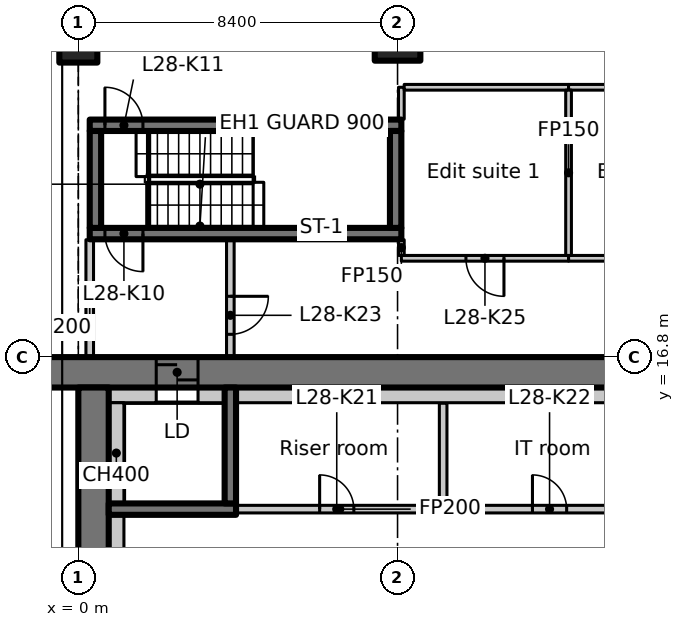
"""IFC4 building model, lengths in metres.
Left out: names, types, materials, properties, quantities, classifications, styles, units other than length and angle.
Written with IfcOpenShell. Run it as: python <this file> out.ifc"""

import sys

from ifc_helpers import new_model, si_unit, direction, frame, frame_2d, origin, origin_2d, place, context, subcontext, project, spatial, rectangle, extrude, element, fill, save


model = new_model("IFC4")
c1 = context("Model", 3, precision=1e-05, world=origin(), true_north=direction((0.0, 1.0)))
c2 = subcontext(c1, "Body", "Model", "MODEL_VIEW")
j1 = project(units=[si_unit("LENGTHUNIT", "METRE"), si_unit("PLANEANGLEUNIT", "RADIAN")], contexts=[c1])
p1 = place(None, origin())
s1 = spatial("IfcSite", under=j1, at=p1, CompositionType="ELEMENT")
p2 = place(p1, origin())
s2 = spatial("IfcBuilding", under=s1, at=p2, CompositionType="ELEMENT")
p3 = place(p2, frame((0.0, 0.0, 116.9)))
s3 = spatial("IfcBuildingStorey", under=s2, at=p3, CompositionType="ELEMENT", Elevation=116.9)
p4 = place(p3, frame((0.0, 25.2, 0.0), z_axis=(0.0, 0.0, 1.0), x_axis=(1.0, 0.0, 0.0)))
e1 = element("IfcColumn", 1, at=p4, inside=s3, PredefinedType="COLUMN", context=c2, shape_type="SweptSolid", body=[
    extrude(rectangle(XDim=1.0, YDim=1.3, at=origin_2d()), origin(), (0.0, 0.0, 1.0), 3.35),
])
p5 = place(p3, frame((8.4, 25.2, 0.0), z_axis=(0.0, 0.0, 1.0), x_axis=(1.0, 0.0, 0.0)))
e2 = element("IfcColumn", 2, at=p5, inside=s3, PredefinedType="COLUMN", context=c2, shape_type="SweptSolid", body=[
    extrude(rectangle(XDim=1.2, YDim=1.2, at=origin_2d()), origin(), (0.0, 0.0, 1.0), 3.35),
])
p6 = place(p3, frame((-1.1, 16.4, 0.0), z_axis=(0.0, 0.0, 1.0), x_axis=(1.0, 0.0, 0.0)))
e3 = element("IfcWall", 3, at=p6, inside=s3, PredefinedType="SHEAR", context=c2, shape_type="SweptSolid", body=[
    extrude(rectangle(XDim=22.1, YDim=0.8, at=frame_2d((11.05, 0.0))), origin(), (0.0, 0.0, 1.0), 3.35),
])
p7 = place(p6, frame((3.15, 0.0, 0.0)))
e4 = element("IfcOpeningElement", 4, at=p7, cuts=e3, PredefinedType="OPENING", context=c2, shape_type="SweptSolid", body=[
    extrude(rectangle(XDim=1.1, YDim=2.3, at=frame_2d((0.55, 1.15))), frame((0.0, 0.41, 0.0), z_axis=(0.0, -1.0, 0.0), x_axis=(1.0, 0.0, 0.0)), (0.0, 0.0, 1.0), 0.82),
])
p8 = place(p3, frame((0.4, 7.136, 0.0), z_axis=(0.0, 0.0, 1.0), x_axis=(0.0, 1.0, 0.0)))
e5 = element("IfcWall", 5, at=p8, inside=s3, PredefinedType="SHEAR", context=c2, shape_type="SweptSolid", body=[
    extrude(rectangle(XDim=8.864, YDim=0.8, at=frame_2d((4.432, 0.0))), origin(), (0.0, 0.0, 1.0), 3.35),
])
p9 = place(p3, frame((0.8, 15.8, 0.0), z_axis=(0.0, 0.0, 1.0), x_axis=(1.0, 0.0, 0.0)))
e6 = element("IfcWall", 6, at=p9, inside=s3, PredefinedType="PARTITIONING", context=c2, shape_type="SweptSolid", body=[
    extrude(rectangle(XDim=1.25, YDim=0.4, at=frame_2d((0.625, 0.0))), origin(), (0.0, 0.0, 1.0), 3.35),
])
p10 = place(p3, frame((0.8, 12.8, 0.0), z_axis=(0.0, 0.0, 1.0), x_axis=(1.0, 0.0, 0.0)))
e7 = element("IfcWall", 7, at=p10, inside=s3, PredefinedType="SHEAR", context=c2, shape_type="SweptSolid", body=[
    extrude(rectangle(XDim=3.35, YDim=0.3, at=frame_2d((1.675, 0.0))), origin(), (0.0, 0.0, 1.0), 3.35),
])
p11 = place(p3, frame((4.0, 12.95, 0.0), z_axis=(0.0, 0.0, 1.0), x_axis=(0.0, 1.0, 0.0)))
e8 = element("IfcWall", 8, at=p11, inside=s3, PredefinedType="SHEAR", context=c2, shape_type="SweptSolid", body=[
    extrude(rectangle(XDim=3.05, YDim=0.3, at=frame_2d((1.525, 0.0))), origin(), (0.0, 0.0, 1.0), 3.35),
])
p12 = place(p3, frame((8.5, 20.05, 0.0), z_axis=(0.0, 0.0, 1.0), x_axis=(-1.0, 0.0, 0.0)))
e9 = element("IfcWall", 9, at=p12, inside=s3, PredefinedType="SHEAR", context=c2, shape_type="SweptSolid", body=[
    extrude(rectangle(XDim=8.2, YDim=0.3, at=frame_2d((4.1, 0.0))), origin(), (0.0, 0.0, 1.0), 3.35),
])
p13 = place(p12, frame((6.8, 0.0, 0.0)))
e10 = element("IfcOpeningElement", 10, at=p13, cuts=e9, PredefinedType="OPENING", context=c2, shape_type="SweptSolid", body=[
    extrude(rectangle(XDim=1.0, YDim=2.1, at=frame_2d((0.5, 1.05))), frame((0.0, 0.16, 0.0), z_axis=(0.0, -1.0, 0.0), x_axis=(1.0, 0.0, 0.0)), (0.0, 0.0, 1.0), 0.32),
])
p14 = place(p3, frame((0.3, 22.9, 0.0), z_axis=(0.0, 0.0, 1.0), x_axis=(1.0, 0.0, 0.0)))
e11 = element("IfcWall", 11, at=p14, inside=s3, PredefinedType="SHEAR", context=c2, shape_type="SweptSolid", body=[
    extrude(rectangle(XDim=8.2, YDim=0.3, at=frame_2d((4.1, 0.0))), origin(), (0.0, 0.0, 1.0), 3.35),
])
p15 = place(p14, frame((0.4, 0.0, 0.0)))
e12 = element("IfcOpeningElement", 12, at=p15, cuts=e11, PredefinedType="OPENING", context=c2, shape_type="SweptSolid", body=[
    extrude(rectangle(XDim=1.0, YDim=2.1, at=frame_2d((0.5, 1.05))), frame((0.0, 0.16, 0.0), z_axis=(0.0, -1.0, 0.0), x_axis=(1.0, 0.0, 0.0)), (0.0, 0.0, 1.0), 0.32),
])
for number, where, z_axis, x_axis in (
    (13, (0.45, 20.2, 0.0), (0.0, 0.0, 1.0), (0.0, 1.0, 0.0)),
    (14, (8.35, 20.2, 0.0), (0.0, 0.0, 1.0), (0.0, 1.0, 0.0)),
):
    element("IfcWall", number, at=place(p3, frame(where, z_axis=z_axis, x_axis=x_axis)), inside=s3, PredefinedType="SHEAR", context=c2, shape_type="SweptSolid", body=[
        extrude(rectangle(XDim=2.55, YDim=0.3, at=frame_2d((1.275, 0.0))), origin(), (0.0, 0.0, 1.0), 3.35),
    ])
p16 = place(p3, frame((0.3, 16.812, 0.0), z_axis=(0.0, 0.0, 1.0), x_axis=(0.0, 1.0, 0.0)))
e15 = element("IfcWall", 15, at=p16, inside=s3, PredefinedType="PARTITIONING", context=c2, shape_type="SweptSolid", body=[
    extrude(rectangle(XDim=3.076, YDim=0.2, at=frame_2d((1.538, 0.0))), origin(), (0.0, 0.0, 1.0), 2.98),
])
p17 = place(p3, frame((4.0, 19.888, 0.0), z_axis=(0.0, 0.0, 1.0), x_axis=(0.0, -1.0, 0.0)))
e16 = element("IfcWall", 16, at=p17, inside=s3, PredefinedType="PARTITIONING", context=c2, shape_type="SweptSolid", body=[
    extrude(rectangle(XDim=3.076, YDim=0.2, at=frame_2d((1.538, 0.0))), origin(), (0.0, 0.0, 1.0), 3.35),
])
p18 = place(p17, frame((1.488, 0.0, 0.0)))
e17 = element("IfcOpeningElement", 17, at=p18, cuts=e16, PredefinedType="OPENING", context=c2, shape_type="SweptSolid", body=[
    extrude(rectangle(XDim=1.0, YDim=2.1, at=frame_2d((0.5, 1.05))), frame((0.0, 0.11, 0.0), z_axis=(0.0, -1.0, 0.0), x_axis=(1.0, 0.0, 0.0)), (0.0, 0.0, 1.0), 0.22),
])
p19 = place(p3, frame((4.162, 12.8, 0.0), z_axis=(0.0, 0.0, 1.0), x_axis=(1.0, 0.0, 0.0)))
e18 = element("IfcWall", 18, at=p19, inside=s3, PredefinedType="PARTITIONING", context=c2, shape_type="SweptSolid", body=[
    extrude(rectangle(XDim=5.438, YDim=0.2, at=frame_2d((2.719, 0.0))), origin(), (0.0, 0.0, 1.0), 3.35),
])
p20 = place(p19, frame((2.188, 0.0, 0.0)))
e19 = element("IfcOpeningElement", 19, at=p20, cuts=e18, PredefinedType="OPENING", context=c2, shape_type="SweptSolid", body=[
    extrude(rectangle(XDim=0.9, YDim=2.1, at=frame_2d((0.45, 1.05))), frame((0.0, 0.11, 0.0), z_axis=(0.0, -1.0, 0.0), x_axis=(1.0, 0.0, 0.0)), (0.0, 0.0, 1.0), 0.22),
])
p21 = place(p3, frame((9.6, 12.8, 0.0), z_axis=(0.0, 0.0, 1.0), x_axis=(1.0, 0.0, 0.0)))
e20 = element("IfcWall", 20, at=p21, inside=s3, PredefinedType="PARTITIONING", context=c2, shape_type="SweptSolid", body=[
    extrude(rectangle(XDim=5.438, YDim=0.2, at=frame_2d((2.719, 0.0))), origin(), (0.0, 0.0, 1.0), 3.35),
])
p22 = place(p21, frame((2.35, 0.0, 0.0)))
e21 = element("IfcOpeningElement", 21, at=p22, cuts=e20, PredefinedType="OPENING", context=c2, shape_type="SweptSolid", body=[
    extrude(rectangle(XDim=0.9, YDim=2.1, at=frame_2d((0.45, 1.05))), frame((0.0, 0.11, 0.0), z_axis=(0.0, -1.0, 0.0), x_axis=(1.0, 0.0, 0.0)), (0.0, 0.0, 1.0), 0.22),
])
p23 = place(p3, frame((9.6, 15.588, 0.0), z_axis=(0.0, 0.0, 1.0), x_axis=(0.0, -1.0, 0.0)))
e22 = element("IfcWall", 22, at=p23, inside=s3, PredefinedType="PARTITIONING", context=c2, shape_type="SweptSolid", body=[
    extrude(rectangle(XDim=2.688, YDim=0.2, at=frame_2d((1.344, 0.0))), origin(), (0.0, 0.0, 1.0), 3.35),
])
p24 = place(p3, frame((12.9, 19.4, 0.0), z_axis=(0.0, 0.0, 1.0), x_axis=(-1.0, 0.0, 0.0)))
e23 = element("IfcWall", 23, at=p24, inside=s3, PredefinedType="PARTITIONING", context=c2, shape_type="SweptSolid", body=[
    extrude(rectangle(XDim=4.4, YDim=0.15, at=frame_2d((2.2, 0.0))), origin(), (0.0, 0.0, 1.0), 3.35),
])
p25 = place(p24, frame((1.7, 0.0, 0.0)))
e24 = element("IfcOpeningElement", 24, at=p25, cuts=e23, PredefinedType="OPENING", context=c2, shape_type="SweptSolid", body=[
    extrude(rectangle(XDim=1.0, YDim=2.1, at=frame_2d((0.5, 1.05))), frame((0.0, 0.085, 0.0), z_axis=(0.0, -1.0, 0.0), x_axis=(1.0, 0.0, 0.0)), (0.0, 0.0, 1.0), 0.17),
])
p26 = place(p3, frame((8.5, 19.475, 0.0), z_axis=(0.0, 0.0, 1.0), x_axis=(0.0, 1.0, 0.0)))
e25 = element("IfcWall", 25, at=p26, inside=s3, PredefinedType="PARTITIONING", context=c2, shape_type="SweptSolid", body=[
    extrude(rectangle(XDim=0.413, YDim=0.15, at=frame_2d((0.207, 0.0))), origin(), (0.0, 0.0, 1.0), 3.35),
])
p27 = place(p3, frame((8.5, 23.062, 0.0), z_axis=(0.0, 0.0, 1.0), x_axis=(0.0, 1.0, 0.0)))
e26 = element("IfcWall", 26, at=p27, inside=s3, PredefinedType="PARTITIONING", context=c2, shape_type="SweptSolid", body=[
    extrude(rectangle(XDim=0.838, YDim=0.15, at=frame_2d((0.419, 0.0))), origin(), (0.0, 0.0, 1.0), 3.35),
])
p28 = place(p3, frame((8.575, 23.9, 0.0), z_axis=(0.0, 0.0, 1.0), x_axis=(1.0, 0.0, 0.0)))
e27 = element("IfcWall", 27, at=p28, inside=s3, PredefinedType="PARTITIONING", context=c2, shape_type="SweptSolid", body=[
    extrude(rectangle(XDim=4.325, YDim=0.15, at=frame_2d((2.163, 0.0))), origin(), (0.0, 0.0, 1.0), 3.35),
])
p29 = place(p3, frame((12.9, 23.9, 0.0), z_axis=(0.0, 0.0, 1.0), x_axis=(1.0, 0.0, 0.0)))
e28 = element("IfcWall", 28, at=p29, inside=s3, PredefinedType="PARTITIONING", context=c2, shape_type="SweptSolid", body=[
    extrude(rectangle(XDim=4.5, YDim=0.15, at=frame_2d((2.25, 0.0))), origin(), (0.0, 0.0, 1.0), 3.35),
])
p30 = place(p3, frame((17.325, 19.4, 0.0), z_axis=(0.0, 0.0, 1.0), x_axis=(-1.0, 0.0, 0.0)))
e29 = element("IfcWall", 29, at=p30, inside=s3, PredefinedType="PARTITIONING", context=c2, shape_type="SweptSolid", body=[
    extrude(rectangle(XDim=4.425, YDim=0.15, at=frame_2d((2.212, 0.0))), origin(), (0.0, 0.0, 1.0), 3.35),
])
p31 = place(p30, frame((1.675, 0.0, 0.0)))
e30 = element("IfcOpeningElement", 30, at=p31, cuts=e29, PredefinedType="OPENING", context=c2, shape_type="SweptSolid", body=[
    extrude(rectangle(XDim=1.0, YDim=2.1, at=frame_2d((0.5, 1.05))), frame((0.0, 0.085, 0.0), z_axis=(0.0, -1.0, 0.0), x_axis=(1.0, 0.0, 0.0)), (0.0, 0.0, 1.0), 0.17),
])
p32 = place(p3, frame((12.9, 23.825, 0.0), z_axis=(0.0, 0.0, 1.0), x_axis=(0.0, -1.0, 0.0)))
e31 = element("IfcWall", 31, at=p32, inside=s3, PredefinedType="PARTITIONING", context=c2, shape_type="SweptSolid", body=[
    extrude(rectangle(XDim=4.35, YDim=0.15, at=frame_2d((2.175, 0.0))), origin(), (0.0, 0.0, 1.0), 3.35),
])
p33 = place(p3, frame((1.0, 9.75, 0.0), z_axis=(0.0, 0.0, 1.0), x_axis=(0.0, 1.0, 0.0)))
e32 = element("IfcWall", 32, at=p33, inside=s3, PredefinedType="PARTITIONING", context=c2, shape_type="SweptSolid", body=[
    extrude(rectangle(XDim=2.9, YDim=0.4, at=frame_2d((1.45, 0.0))), origin(), (0.0, 0.0, 1.0), 3.35),
])
p34 = place(p3, frame((1.0, 12.95, 0.0), z_axis=(0.0, 0.0, 1.0), x_axis=(0.0, 1.0, 0.0)))
e33 = element("IfcWall", 33, at=p34, inside=s3, PredefinedType="PARTITIONING", context=c2, shape_type="SweptSolid", body=[
    extrude(rectangle(XDim=2.65, YDim=0.4, at=frame_2d((1.325, 0.0))), origin(), (0.0, 0.0, 1.0), 3.35),
])
p35 = place(p3, frame((3.15, 15.8, 0.0), z_axis=(0.0, 0.0, 1.0), x_axis=(1.0, 0.0, 0.0)))
e34 = element("IfcWall", 34, at=p35, inside=s3, PredefinedType="PARTITIONING", context=c2, shape_type="SweptSolid", body=[
    extrude(rectangle(XDim=0.7, YDim=0.4, at=frame_2d((0.35, 0.0))), origin(), (0.0, 0.0, 1.0), 3.35),
])
p36 = place(p3, frame((4.15, 15.8, 0.0), z_axis=(0.0, 0.0, 1.0), x_axis=(1.0, 0.0, 0.0)))
e35 = element("IfcWall", 35, at=p36, inside=s3, PredefinedType="PARTITIONING", context=c2, shape_type="SweptSolid", body=[
    extrude(rectangle(XDim=10.9, YDim=0.4, at=frame_2d((5.45, 0.0))), origin(), (0.0, 0.0, 1.0), 3.35),
])
p37 = place(p7, origin())
e36 = element("IfcDoor", 36, at=p37, inside=s3, OperationType="SLIDING_TO_LEFT", PredefinedType="DOOR", context=c2, shape_type="SweptSolid", body=[
    extrude(rectangle(XDim=1.1, YDim=2.3, at=frame_2d((0.55, 1.15))), frame((0.0, 0.025, 0.0), z_axis=(0.0, -1.0, 0.0), x_axis=(1.0, 0.0, 0.0)), (0.0, 0.0, 1.0), 0.05),
])
fill(e4, e36)
p38 = place(p13, origin())
e37 = element("IfcDoor", 37, at=p38, inside=s3, OperationType="SINGLE_SWING_RIGHT", PredefinedType="DOOR", context=c2, shape_type="SweptSolid", body=[
    extrude(rectangle(XDim=1.0, YDim=2.1, at=frame_2d((0.5, 1.05))), frame((0.0, 0.025, 0.0), z_axis=(0.0, -1.0, 0.0), x_axis=(1.0, 0.0, 0.0)), (0.0, 0.0, 1.0), 0.05),
])
fill(e10, e37)
p39 = place(p15, origin())
e38 = element("IfcDoor", 38, at=p39, inside=s3, OperationType="SINGLE_SWING_LEFT", PredefinedType="DOOR", context=c2, shape_type="SweptSolid", body=[
    extrude(rectangle(XDim=1.0, YDim=2.1, at=frame_2d((0.5, 1.05))), frame((0.0, 0.025, 0.0), z_axis=(0.0, -1.0, 0.0), x_axis=(1.0, 0.0, 0.0)), (0.0, 0.0, 1.0), 0.05),
])
fill(e12, e38)
p40 = place(p20, origin())
e39 = element("IfcDoor", 39, at=p40, inside=s3, OperationType="SINGLE_SWING_LEFT", PredefinedType="DOOR", context=c2, shape_type="SweptSolid", body=[
    extrude(rectangle(XDim=0.9, YDim=2.1, at=frame_2d((0.45, 1.05))), frame((0.0, 0.025, 0.0), z_axis=(0.0, -1.0, 0.0), x_axis=(1.0, 0.0, 0.0)), (0.0, 0.0, 1.0), 0.05),
])
fill(e19, e39)
p41 = place(p22, origin())
e40 = element("IfcDoor", 40, at=p41, inside=s3, OperationType="SINGLE_SWING_RIGHT", PredefinedType="DOOR", context=c2, shape_type="SweptSolid", body=[
    extrude(rectangle(XDim=0.9, YDim=2.1, at=frame_2d((0.45, 1.05))), frame((0.0, 0.025, 0.0), z_axis=(0.0, -1.0, 0.0), x_axis=(1.0, 0.0, 0.0)), (0.0, 0.0, 1.0), 0.05),
])
fill(e21, e40)
p42 = place(p18, origin())
e41 = element("IfcDoor", 41, at=p42, inside=s3, OperationType="SINGLE_SWING_LEFT", PredefinedType="DOOR", context=c2, shape_type="SweptSolid", body=[
    extrude(rectangle(XDim=1.0, YDim=2.1, at=frame_2d((0.5, 1.05))), frame((0.0, 0.025, 0.0), z_axis=(0.0, -1.0, 0.0), x_axis=(1.0, 0.0, 0.0)), (0.0, 0.0, 1.0), 0.05),
])
fill(e17, e41)
p43 = place(p25, origin())
e42 = element("IfcDoor", 42, at=p43, inside=s3, OperationType="SINGLE_SWING_LEFT", PredefinedType="DOOR", context=c2, shape_type="SweptSolid", body=[
    extrude(rectangle(XDim=1.0, YDim=2.1, at=frame_2d((0.5, 1.05))), frame((0.0, 0.025, 0.0), z_axis=(0.0, -1.0, 0.0), x_axis=(1.0, 0.0, 0.0)), (0.0, 0.0, 1.0), 0.05),
])
fill(e24, e42)
save(model, sys.argv[1])
